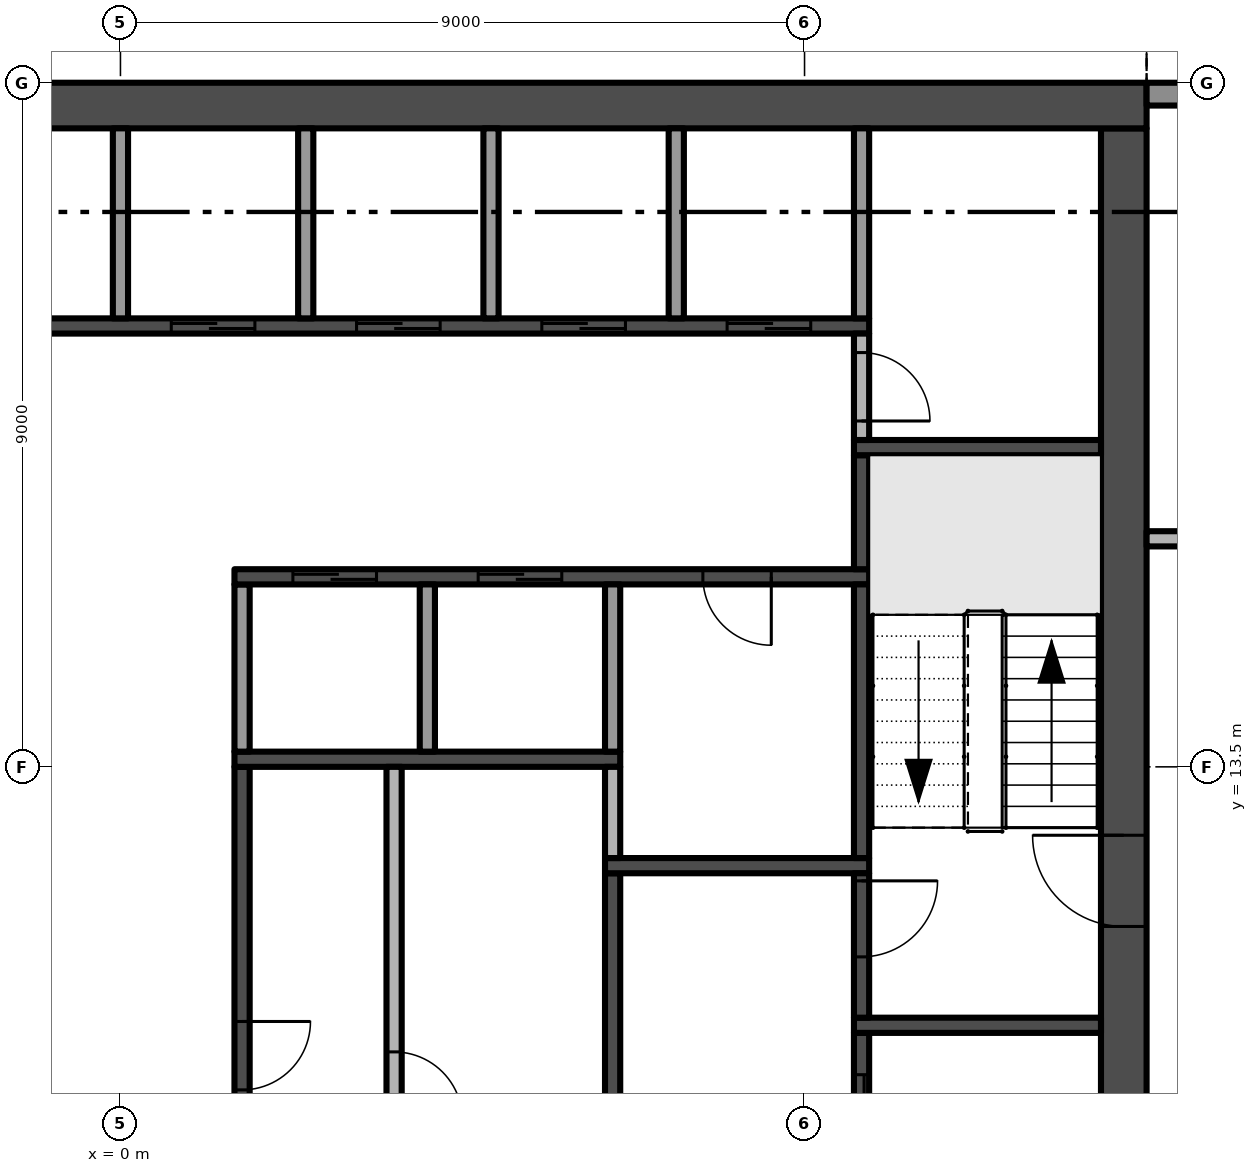
"""IFC4 building model, lengths in metres.
Left out: names, types, materials, properties, quantities, classifications, styles, units other than length and angle.
Written with IfcOpenShell. Run it as: python <this file> out.ifc"""

import sys

from ifc_helpers import new_model, si_unit, direction, frame, frame_2d, origin, place, context, subcontext, project, spatial, polyline, rectangle, outline, extrude, element, fill, save


model = new_model("IFC4")
c1 = context("Model", 3, precision=1e-05, world=origin(), true_north=direction((0.0, 1.0)))
c2 = subcontext(c1, "Body", "Model", "MODEL_VIEW")
j1 = project(units=[si_unit("LENGTHUNIT", "METRE"), si_unit("PLANEANGLEUNIT", "RADIAN")], contexts=[c1])
p1 = place(None, origin())
s1 = spatial("IfcSite", under=j1, at=p1, CompositionType="ELEMENT")
p2 = place(p1, origin())
s2 = spatial("IfcBuilding", under=s1, at=p2, CompositionType="ELEMENT")
p3 = place(p2, frame((0.0, 0.0, 203.4)))
s3 = spatial("IfcBuildingStorey", under=s2, at=p3, CompositionType="ELEMENT", Elevation=203.4)
p4 = place(p3, frame((13.2, 5.1, -0.3), z_axis=(0.0, 0.0, 1.0), x_axis=(0.0, 1.0, 0.0)))
e1 = element("IfcWall", 1, at=p4, inside=s3, PredefinedType="SHEAR", context=c2, shape_type="SweptSolid", body=[
    extrude(rectangle(XDim=16.8, YDim=0.6, at=frame_2d((8.4, 0.0))), origin(), (0.0, 0.0, 1.0), 3.8),
])
p5 = place(p4, frame((6.3, 0.0, 0.3)))
e2 = element("IfcOpeningElement", 2, at=p5, cuts=e1, PredefinedType="OPENING", context=c2, shape_type="SweptSolid", body=[
    extrude(rectangle(XDim=1.2, YDim=2.2, at=frame_2d((0.6, 1.1))), frame((0.0, 0.31, 0.0), z_axis=(0.0, -1.0, 0.0), x_axis=(1.0, 0.0, 0.0)), (0.0, 0.0, 1.0), 0.62),
])
p6 = place(p3, frame((13.5, 22.2, -0.3), z_axis=(0.0, 0.0, 1.0), x_axis=(-1.0, 0.0, 0.0)))
e3 = element("IfcWall", 3, at=p6, inside=s3, PredefinedType="SHEAR", context=c2, shape_type="SweptSolid", body=[
    extrude(rectangle(XDim=27.0, YDim=0.6, at=frame_2d((13.5, 0.0))), origin(), (0.0, 0.0, 1.0), 3.8),
])
p7 = place(p3, frame((13.5, 22.35, 0.0), z_axis=(0.0, 0.0, 1.0), x_axis=(1.0, 0.0, 0.0)))
e4 = element("IfcWall", 4, at=p7, inside=s3, PredefinedType="SOLIDWALL", context=c2, shape_type="SweptSolid", body=[
    extrude(rectangle(XDim=4.0, YDim=0.3, at=frame_2d((2.0, 0.0))), origin(), (0.0, 0.0, 1.0), 3.5),
])
p8 = place(p7, frame((0.625, 0.0, 0.0)))
e5 = element("IfcOpeningElement", 5, at=p8, cuts=e4, PredefinedType="OPENING", context=c2, shape_type="SweptSolid", body=[
    extrude(rectangle(XDim=3.075, YDim=2.4, at=frame_2d((1.538, 1.2))), frame((0.0, 0.16, 0.0), z_axis=(0.0, -1.0, 0.0), x_axis=(1.0, 0.0, 0.0)), (0.0, 0.0, 1.0), 0.32),
])
p9 = place(p3, origin())
e6 = element("IfcWall", 6, at=p9, inside=s3, PredefinedType="USERDEFINED", context=c2, shape_type="SweptSolid", body=[
    extrude(outline(polyline([(22.5, 23.1), (21.0, 23.329), (19.5, 23.929), (18.0, 24.671), (16.5, 25.271), (15.0, 25.5), (13.5, 25.271), (13.538, 25.024), (15.0, 25.247), (16.434, 25.028), (17.898, 24.442), (19.398, 23.701), (20.934, 23.086), (22.462, 22.853), (22.5, 23.1)])), origin(), (0.0, 0.0, 1.0), 0.9),
])
p10 = place(p3, frame((-9.85, 19.3, 0.0), z_axis=(0.0, 0.0, 1.0), x_axis=(1.0, 0.0, 0.0)))
e7 = element("IfcWall", 7, at=p10, inside=s3, PredefinedType="SHEAR", context=c2, shape_type="SweptSolid", body=[
    extrude(rectangle(XDim=19.7, YDim=0.2, at=frame_2d((9.85, 0.0))), origin(), (0.0, 0.0, 1.0), 3.5),
])
p11 = place(p10, frame((10.519, 0.0, 0.0)))
e8 = element("IfcOpeningElement", 8, at=p11, cuts=e7, PredefinedType="OPENING", context=c2, shape_type="SweptSolid", body=[
    extrude(rectangle(XDim=1.1, YDim=2.1, at=frame_2d((0.55, 1.05))), frame((0.0, 0.11, 0.0), z_axis=(0.0, -1.0, 0.0), x_axis=(1.0, 0.0, 0.0)), (0.0, 0.0, 1.0), 0.22),
])
p12 = place(p10, frame((12.956, 0.0, 0.0)))
e9 = element("IfcOpeningElement", 9, at=p12, cuts=e7, PredefinedType="OPENING", context=c2, shape_type="SweptSolid", body=[
    extrude(rectangle(XDim=1.1, YDim=2.1, at=frame_2d((0.55, 1.05))), frame((0.0, 0.11, 0.0), z_axis=(0.0, -1.0, 0.0), x_axis=(1.0, 0.0, 0.0)), (0.0, 0.0, 1.0), 0.22),
])
p13 = place(p10, frame((15.394, 0.0, 0.0)))
e10 = element("IfcOpeningElement", 10, at=p13, cuts=e7, PredefinedType="OPENING", context=c2, shape_type="SweptSolid", body=[
    extrude(rectangle(XDim=1.1, YDim=2.1, at=frame_2d((0.55, 1.05))), frame((0.0, 0.11, 0.0), z_axis=(0.0, -1.0, 0.0), x_axis=(1.0, 0.0, 0.0)), (0.0, 0.0, 1.0), 0.22),
])
p14 = place(p10, frame((17.831, 0.0, 0.0)))
e11 = element("IfcOpeningElement", 11, at=p14, cuts=e7, PredefinedType="OPENING", context=c2, shape_type="SweptSolid", body=[
    extrude(rectangle(XDim=1.1, YDim=2.1, at=frame_2d((0.55, 1.05))), frame((0.0, 0.11, 0.0), z_axis=(0.0, -1.0, 0.0), x_axis=(1.0, 0.0, 0.0)), (0.0, 0.0, 1.0), 0.22),
])
p15 = place(p10, frame((2.087, 0.0, 0.0)))
e12 = element("IfcOpeningElement", 12, at=p15, cuts=e7, PredefinedType="OPENING", context=c2, shape_type="SweptSolid", body=[
    extrude(rectangle(XDim=0.9, YDim=2.1, at=frame_2d((0.45, 1.05))), frame((0.0, 0.11, 0.0), z_axis=(0.0, -1.0, 0.0), x_axis=(1.0, 0.0, 0.0)), (0.0, 0.0, 1.0), 0.22),
])
p16 = place(p10, frame((6.963, 0.0, 0.0)))
e13 = element("IfcOpeningElement", 13, at=p16, cuts=e7, PredefinedType="OPENING", context=c2, shape_type="SweptSolid", body=[
    extrude(rectangle(XDim=0.9, YDim=2.1, at=frame_2d((0.45, 1.05))), frame((0.0, 0.11, 0.0), z_axis=(0.0, -1.0, 0.0), x_axis=(1.0, 0.0, 0.0)), (0.0, 0.0, 1.0), 0.22),
])
p17 = place(p3, frame((0.0, 19.4, 0.0), z_axis=(0.0, 0.0, 1.0), x_axis=(0.0, 1.0, 0.0)))
e14 = element("IfcWall", 14, at=p17, inside=s3, PredefinedType="PARTITIONING", context=c2, shape_type="SweptSolid", body=[
    extrude(rectangle(XDim=2.5, YDim=0.2, at=frame_2d((1.25, 0.0))), origin(), (0.0, 0.0, 1.0), 3.5),
])
p18 = place(p3, frame((1.6, 13.5, 0.0), z_axis=(0.0, 0.0, 1.0), x_axis=(0.0, -1.0, 0.0)))
e15 = element("IfcWall", 15, at=p18, inside=s3, PredefinedType="SHEAR", context=c2, shape_type="SweptSolid", body=[
    extrude(rectangle(XDim=8.4, YDim=0.2, at=frame_2d((4.2, 0.0))), origin(), (0.0, 0.0, 1.0), 3.5),
])
p19 = place(p18, frame((3.35, 0.0, 0.0)))
e16 = element("IfcOpeningElement", 16, at=p19, cuts=e15, PredefinedType="OPENING", context=c2, shape_type="SweptSolid", body=[
    extrude(rectangle(XDim=0.9, YDim=2.1, at=frame_2d((0.45, 1.05))), frame((0.0, 0.11, 0.0), z_axis=(0.0, -1.0, 0.0), x_axis=(1.0, 0.0, 0.0)), (0.0, 0.0, 1.0), 0.22),
])
p20 = place(p3, frame((1.5, 13.6, 0.0), z_axis=(0.0, 0.0, 1.0), x_axis=(1.0, 0.0, 0.0)))
e17 = element("IfcWall", 17, at=p20, inside=s3, PredefinedType="SHEAR", context=c2, shape_type="SweptSolid", body=[
    extrude(rectangle(XDim=5.075, YDim=0.2, at=frame_2d((2.538, 0.0))), origin(), (0.0, 0.0, 1.0), 3.5),
])
p21 = place(p3, frame((1.6, 13.7, 0.0), z_axis=(0.0, 0.0, 1.0), x_axis=(0.0, 1.0, 0.0)))
e18 = element("IfcWall", 18, at=p21, inside=s3, PredefinedType="PARTITIONING", context=c2, shape_type="SweptSolid", body=[
    extrude(rectangle(XDim=2.2, YDim=0.2, at=frame_2d((1.1, 0.0))), origin(), (0.0, 0.0, 1.0), 3.5),
])
p22 = place(p3, frame((9.85, 16.0, 0.0), z_axis=(0.0, 0.0, 1.0), x_axis=(-1.0, 0.0, 0.0)))
e19 = element("IfcWall", 19, at=p22, inside=s3, PredefinedType="SHEAR", context=c2, shape_type="SweptSolid", body=[
    extrude(rectangle(XDim=8.35, YDim=0.2, at=frame_2d((4.175, 0.0))), origin(), (0.0, 0.0, 1.0), 3.5),
])
p23 = place(p22, frame((6.481, 0.0, 0.0)))
e20 = element("IfcOpeningElement", 20, at=p23, cuts=e19, PredefinedType="OPENING", context=c2, shape_type="SweptSolid", body=[
    extrude(rectangle(XDim=1.1, YDim=2.1, at=frame_2d((0.55, 1.05))), frame((0.0, 0.11, 0.0), z_axis=(0.0, -1.0, 0.0), x_axis=(1.0, 0.0, 0.0)), (0.0, 0.0, 1.0), 0.22),
])
p24 = place(p22, frame((4.044, 0.0, 0.0)))
e21 = element("IfcOpeningElement", 21, at=p24, cuts=e19, PredefinedType="OPENING", context=c2, shape_type="SweptSolid", body=[
    extrude(rectangle(XDim=1.1, YDim=2.1, at=frame_2d((0.55, 1.05))), frame((0.0, 0.11, 0.0), z_axis=(0.0, -1.0, 0.0), x_axis=(1.0, 0.0, 0.0)), (0.0, 0.0, 1.0), 0.22),
])
p25 = place(p22, frame((1.288, 0.0, 0.0)))
e22 = element("IfcOpeningElement", 22, at=p25, cuts=e19, PredefinedType="OPENING", context=c2, shape_type="SweptSolid", body=[
    extrude(rectangle(XDim=0.9, YDim=2.1, at=frame_2d((0.45, 1.05))), frame((0.0, 0.11, 0.0), z_axis=(0.0, -1.0, 0.0), x_axis=(1.0, 0.0, 0.0)), (0.0, 0.0, 1.0), 0.22),
])
p26 = place(p3, frame((2.438, 19.4, 0.0), z_axis=(0.0, 0.0, 1.0), x_axis=(0.0, 1.0, 0.0)))
e23 = element("IfcWall", 23, at=p26, inside=s3, PredefinedType="PARTITIONING", context=c2, shape_type="SweptSolid", body=[
    extrude(rectangle(XDim=2.5, YDim=0.2, at=frame_2d((1.25, 0.0))), origin(), (0.0, 0.0, 1.0), 3.5),
])
p27 = place(p3, frame((3.6, 13.5, 0.0), z_axis=(0.0, 0.0, 1.0), x_axis=(0.0, -1.0, 0.0)))
e24 = element("IfcWall", 24, at=p27, inside=s3, PredefinedType="PARTITIONING", context=c2, shape_type="SweptSolid", body=[
    extrude(rectangle(XDim=8.4, YDim=0.2, at=frame_2d((4.2, 0.0))), origin(), (0.0, 0.0, 1.0), 3.5),
])
p28 = place(p27, frame((3.75, 0.0, 0.0)))
e25 = element("IfcOpeningElement", 25, at=p28, cuts=e24, PredefinedType="OPENING", context=c2, shape_type="SweptSolid", body=[
    extrude(rectangle(XDim=0.9, YDim=2.1, at=frame_2d((0.45, 1.05))), frame((0.0, 0.11, 0.0), z_axis=(0.0, -1.0, 0.0), x_axis=(1.0, 0.0, 0.0)), (0.0, 0.0, 1.0), 0.22),
])
p29 = place(p3, frame((4.037, 13.7, 0.0), z_axis=(0.0, 0.0, 1.0), x_axis=(0.0, 1.0, 0.0)))
e26 = element("IfcWall", 26, at=p29, inside=s3, PredefinedType="PARTITIONING", context=c2, shape_type="SweptSolid", body=[
    extrude(rectangle(XDim=2.2, YDim=0.2, at=frame_2d((1.1, 0.0))), origin(), (0.0, 0.0, 1.0), 3.5),
])
p30 = place(p3, frame((4.875, 19.4, 0.0), z_axis=(0.0, 0.0, 1.0), x_axis=(0.0, 1.0, 0.0)))
e27 = element("IfcWall", 27, at=p30, inside=s3, PredefinedType="PARTITIONING", context=c2, shape_type="SweptSolid", body=[
    extrude(rectangle(XDim=2.5, YDim=0.2, at=frame_2d((1.25, 0.0))), origin(), (0.0, 0.0, 1.0), 3.5),
])
p31 = place(p3, frame((6.475, 5.1, 0.0), z_axis=(0.0, 0.0, 1.0), x_axis=(0.0, 1.0, 0.0)))
e28 = element("IfcWall", 28, at=p31, inside=s3, PredefinedType="SHEAR", context=c2, shape_type="SweptSolid", body=[
    extrude(rectangle(XDim=7.0, YDim=0.2, at=frame_2d((3.5, 0.0))), origin(), (0.0, 0.0, 1.0), 3.5),
])
p32 = place(p3, frame((6.375, 12.2, 0.0), z_axis=(0.0, 0.0, 1.0), x_axis=(1.0, 0.0, 0.0)))
e29 = element("IfcWall", 29, at=p32, inside=s3, PredefinedType="SHEAR", context=c2, shape_type="SweptSolid", body=[
    extrude(rectangle(XDim=3.475, YDim=0.2, at=frame_2d((1.738, 0.0))), origin(), (0.0, 0.0, 1.0), 3.5),
])
p33 = place(p3, frame((6.475, 12.3, 0.0), z_axis=(0.0, 0.0, 1.0), x_axis=(0.0, 1.0, 0.0)))
e30 = element("IfcWall", 30, at=p33, inside=s3, PredefinedType="PARTITIONING", context=c2, shape_type="SweptSolid", body=[
    extrude(rectangle(XDim=1.2, YDim=0.2, at=frame_2d((0.6, 0.0))), origin(), (0.0, 0.0, 1.0), 3.5),
])
p34 = place(p3, frame((6.475, 13.7, 0.0), z_axis=(0.0, 0.0, 1.0), x_axis=(0.0, 1.0, 0.0)))
e31 = element("IfcWall", 31, at=p34, inside=s3, PredefinedType="PARTITIONING", context=c2, shape_type="SweptSolid", body=[
    extrude(rectangle(XDim=2.2, YDim=0.2, at=frame_2d((1.1, 0.0))), origin(), (0.0, 0.0, 1.0), 3.5),
])
p35 = place(p3, frame((7.312, 19.4, 0.0), z_axis=(0.0, 0.0, 1.0), x_axis=(0.0, 1.0, 0.0)))
e32 = element("IfcWall", 32, at=p35, inside=s3, PredefinedType="PARTITIONING", context=c2, shape_type="SweptSolid", body=[
    extrude(rectangle(XDim=2.5, YDim=0.2, at=frame_2d((1.25, 0.0))), origin(), (0.0, 0.0, 1.0), 3.5),
])
p36 = place(p3, frame((9.75, 7.8, 0.0), z_axis=(0.0, 0.0, 1.0), x_axis=(0.0, 1.0, 0.0)))
e33 = element("IfcWall", 33, at=p36, inside=s3, PredefinedType="SHEAR", context=c2, shape_type="SweptSolid", body=[
    extrude(rectangle(XDim=2.2, YDim=0.2, at=frame_2d((1.1, 0.0))), origin(), (0.0, 0.0, 1.0), 3.5),
])
p37 = place(p36, frame((0.55, 0.0, 0.0)))
e34 = element("IfcOpeningElement", 34, at=p37, cuts=e33, PredefinedType="OPENING", context=c2, shape_type="SweptSolid", body=[
    extrude(rectangle(XDim=1.1, YDim=2.1, at=frame_2d((0.55, 1.05))), frame((0.0, 0.11, 0.0), z_axis=(0.0, -1.0, 0.0), x_axis=(1.0, 0.0, 0.0)), (0.0, 0.0, 1.0), 0.22),
])
p38 = place(p3, frame((9.65, 10.1, 0.0), z_axis=(0.0, 0.0, 1.0), x_axis=(1.0, 0.0, 0.0)))
e35 = element("IfcWall", 35, at=p38, inside=s3, PredefinedType="SHEAR", context=c2, shape_type="SweptSolid", body=[
    extrude(rectangle(XDim=3.25, YDim=0.2, at=frame_2d((1.625, 0.0))), origin(), (0.0, 0.0, 1.0), 3.5),
])
p39 = place(p3, frame((9.75, 12.1, 0.0), z_axis=(0.0, 0.0, 1.0), x_axis=(0.0, -1.0, 0.0)))
e36 = element("IfcWall", 36, at=p39, inside=s3, PredefinedType="SHEAR", context=c2, shape_type="SweptSolid", body=[
    extrude(rectangle(XDim=1.9, YDim=0.2, at=frame_2d((0.95, 0.0))), origin(), (0.0, 0.0, 1.0), 3.5),
])
p40 = place(p39, frame((0.1, 0.0, 0.0)))
e37 = element("IfcOpeningElement", 37, at=p40, cuts=e36, PredefinedType="OPENING", context=c2, shape_type="SweptSolid", body=[
    extrude(rectangle(XDim=1.0, YDim=2.2, at=frame_2d((0.5, 1.1))), frame((0.0, 0.11, 0.0), z_axis=(0.0, -1.0, 0.0), x_axis=(1.0, 0.0, 0.0)), (0.0, 0.0, 1.0), 0.22),
])
p41 = place(p3, frame((9.75, 12.3, 0.0), z_axis=(0.0, 0.0, 1.0), x_axis=(0.0, 1.0, 0.0)))
e38 = element("IfcWall", 38, at=p41, inside=s3, PredefinedType="SHEAR", context=c2, shape_type="SweptSolid", body=[
    extrude(rectangle(XDim=3.6, YDim=0.2, at=frame_2d((1.8, 0.0))), origin(), (0.0, 0.0, 1.0), 3.5),
])
p42 = place(p3, frame((9.75, 16.1, 0.0), z_axis=(0.0, 0.0, 1.0), x_axis=(0.0, 1.0, 0.0)))
e39 = element("IfcWall", 39, at=p42, inside=s3, PredefinedType="SHEAR", context=c2, shape_type="SweptSolid", body=[
    extrude(rectangle(XDim=1.5, YDim=0.2, at=frame_2d((0.75, 0.0))), origin(), (0.0, 0.0, 1.0), 3.5),
])
p43 = place(p3, frame((9.65, 17.7, 0.0), z_axis=(0.0, 0.0, 1.0), x_axis=(1.0, 0.0, 0.0)))
e40 = element("IfcWall", 40, at=p43, inside=s3, PredefinedType="SHEAR", context=c2, shape_type="SweptSolid", body=[
    extrude(rectangle(XDim=3.25, YDim=0.2, at=frame_2d((1.625, 0.0))), origin(), (0.0, 0.0, 1.0), 3.5),
])
p44 = place(p3, frame((9.75, 19.2, 0.0), z_axis=(0.0, 0.0, 1.0), x_axis=(0.0, -1.0, 0.0)))
e41 = element("IfcWall", 41, at=p44, inside=s3, PredefinedType="PARTITIONING", context=c2, shape_type="SweptSolid", body=[
    extrude(rectangle(XDim=1.4, YDim=0.2, at=frame_2d((0.7, 0.0))), origin(), (0.0, 0.0, 1.0), 3.5),
])
p45 = place(p44, frame((0.25, 0.0, 0.0)))
e42 = element("IfcOpeningElement", 42, at=p45, cuts=e41, PredefinedType="OPENING", context=c2, shape_type="SweptSolid", body=[
    extrude(rectangle(XDim=0.9, YDim=2.1, at=frame_2d((0.45, 1.05))), frame((0.0, 0.11, 0.0), z_axis=(0.0, -1.0, 0.0), x_axis=(1.0, 0.0, 0.0)), (0.0, 0.0, 1.0), 0.22),
])
p46 = place(p3, frame((9.75, 19.4, 0.0), z_axis=(0.0, 0.0, 1.0), x_axis=(0.0, 1.0, 0.0)))
e43 = element("IfcWall", 43, at=p46, inside=s3, PredefinedType="PARTITIONING", context=c2, shape_type="SweptSolid", body=[
    extrude(rectangle(XDim=2.5, YDim=0.2, at=frame_2d((1.25, 0.0))), origin(), (0.0, 0.0, 1.0), 3.5),
])
p47 = place(p3, frame((13.5, 16.5, 0.0), z_axis=(0.0, 0.0, 1.0), x_axis=(1.0, 0.0, 0.0)))
e44 = element("IfcWall", 44, at=p47, inside=s3, PredefinedType="PARTITIONING", context=c2, shape_type="SweptSolid", body=[
    extrude(rectangle(XDim=3.825, YDim=0.2, at=frame_2d((1.913, 0.0))), origin(), (0.0, 0.0, 1.0), 3.5),
])
p48 = place(p47, frame((1.55, 0.0, 0.0)))
e45 = element("IfcOpeningElement", 45, at=p48, cuts=e44, PredefinedType="OPENING", context=c2, shape_type="SweptSolid", body=[
    extrude(rectangle(XDim=0.9, YDim=2.1, at=frame_2d((0.45, 1.05))), frame((0.0, 0.11, 0.0), z_axis=(0.0, -1.0, 0.0), x_axis=(1.0, 0.0, 0.0)), (0.0, 0.0, 1.0), 0.22),
])
p49 = place(p5, frame((1.2, 0.0, 0.0), z_axis=(0.0, 0.0, 1.0), x_axis=(-1.0, 0.0, 0.0)))
e46 = element("IfcDoor", 46, at=p49, inside=s3, OperationType="SINGLE_SWING_LEFT", PredefinedType="DOOR", context=c2, shape_type="SweptSolid", body=[
    extrude(rectangle(XDim=1.2, YDim=2.2, at=frame_2d((0.6, 1.1))), frame((0.0, 0.025, 0.0), z_axis=(0.0, -1.0, 0.0), x_axis=(1.0, 0.0, 0.0)), (0.0, 0.0, 1.0), 0.05),
])
fill(e2, e46)
p50 = place(p40, origin())
e47 = element("IfcDoor", 47, at=p50, inside=s3, OperationType="SINGLE_SWING_LEFT", PredefinedType="DOOR", context=c2, shape_type="SweptSolid", body=[
    extrude(rectangle(XDim=1.0, YDim=2.2, at=frame_2d((0.5, 1.1))), frame((0.0, 0.025, 0.0), z_axis=(0.0, -1.0, 0.0), x_axis=(1.0, 0.0, 0.0)), (0.0, 0.0, 1.0), 0.05),
])
fill(e37, e47)
p51 = place(p11, origin())
e48 = element("IfcDoor", 48, at=p51, inside=s3, OperationType="SLIDING_TO_RIGHT", PredefinedType="DOOR", context=c2, shape_type="SweptSolid", body=[
    extrude(rectangle(XDim=1.1, YDim=2.1, at=frame_2d((0.55, 1.05))), frame((0.0, 0.025, 0.0), z_axis=(0.0, -1.0, 0.0), x_axis=(1.0, 0.0, 0.0)), (0.0, 0.0, 1.0), 0.05),
])
fill(e8, e48)
p52 = place(p12, origin())
e49 = element("IfcDoor", 49, at=p52, inside=s3, OperationType="SLIDING_TO_RIGHT", PredefinedType="DOOR", context=c2, shape_type="SweptSolid", body=[
    extrude(rectangle(XDim=1.1, YDim=2.1, at=frame_2d((0.55, 1.05))), frame((0.0, 0.025, 0.0), z_axis=(0.0, -1.0, 0.0), x_axis=(1.0, 0.0, 0.0)), (0.0, 0.0, 1.0), 0.05),
])
fill(e9, e49)
p53 = place(p13, origin())
e50 = element("IfcDoor", 50, at=p53, inside=s3, OperationType="SLIDING_TO_RIGHT", PredefinedType="DOOR", context=c2, shape_type="SweptSolid", body=[
    extrude(rectangle(XDim=1.1, YDim=2.1, at=frame_2d((0.55, 1.05))), frame((0.0, 0.025, 0.0), z_axis=(0.0, -1.0, 0.0), x_axis=(1.0, 0.0, 0.0)), (0.0, 0.0, 1.0), 0.05),
])
fill(e10, e50)
p54 = place(p14, origin())
e51 = element("IfcDoor", 51, at=p54, inside=s3, OperationType="SLIDING_TO_RIGHT", PredefinedType="DOOR", context=c2, shape_type="SweptSolid", body=[
    extrude(rectangle(XDim=1.1, YDim=2.1, at=frame_2d((0.55, 1.05))), frame((0.0, 0.025, 0.0), z_axis=(0.0, -1.0, 0.0), x_axis=(1.0, 0.0, 0.0)), (0.0, 0.0, 1.0), 0.05),
])
fill(e11, e51)
p55 = place(p23, origin())
e52 = element("IfcDoor", 52, at=p55, inside=s3, OperationType="SLIDING_TO_RIGHT", PredefinedType="DOOR", context=c2, shape_type="SweptSolid", body=[
    extrude(rectangle(XDim=1.1, YDim=2.1, at=frame_2d((0.55, 1.05))), frame((0.0, 0.025, 0.0), z_axis=(0.0, -1.0, 0.0), x_axis=(1.0, 0.0, 0.0)), (0.0, 0.0, 1.0), 0.05),
])
fill(e20, e52)
p56 = place(p24, origin())
e53 = element("IfcDoor", 53, at=p56, inside=s3, OperationType="SLIDING_TO_RIGHT", PredefinedType="DOOR", context=c2, shape_type="SweptSolid", body=[
    extrude(rectangle(XDim=1.1, YDim=2.1, at=frame_2d((0.55, 1.05))), frame((0.0, 0.025, 0.0), z_axis=(0.0, -1.0, 0.0), x_axis=(1.0, 0.0, 0.0)), (0.0, 0.0, 1.0), 0.05),
])
fill(e21, e53)
p57 = place(p37, origin())
e54 = element("IfcDoor", 54, at=p57, inside=s3, OperationType="SLIDING_TO_RIGHT", PredefinedType="DOOR", context=c2, shape_type="SweptSolid", body=[
    extrude(rectangle(XDim=1.1, YDim=2.1, at=frame_2d((0.55, 1.05))), frame((0.0, 0.025, 0.0), z_axis=(0.0, -1.0, 0.0), x_axis=(1.0, 0.0, 0.0)), (0.0, 0.0, 1.0), 0.05),
])
fill(e34, e54)
p58 = place(p19, origin())
e55 = element("IfcDoor", 55, at=p58, inside=s3, OperationType="SINGLE_SWING_LEFT", PredefinedType="DOOR", context=c2, shape_type="SweptSolid", body=[
    extrude(rectangle(XDim=0.9, YDim=2.1, at=frame_2d((0.45, 1.05))), frame((0.0, 0.025, 0.0), z_axis=(0.0, -1.0, 0.0), x_axis=(1.0, 0.0, 0.0)), (0.0, 0.0, 1.0), 0.05),
])
fill(e16, e55)
p59 = place(p25, origin())
e56 = element("IfcDoor", 56, at=p59, inside=s3, OperationType="SINGLE_SWING_LEFT", PredefinedType="DOOR", context=c2, shape_type="SweptSolid", body=[
    extrude(rectangle(XDim=0.9, YDim=2.1, at=frame_2d((0.45, 1.05))), frame((0.0, 0.025, 0.0), z_axis=(0.0, -1.0, 0.0), x_axis=(1.0, 0.0, 0.0)), (0.0, 0.0, 1.0), 0.05),
])
fill(e22, e56)
p60 = place(p45, origin())
e57 = element("IfcDoor", 57, at=p60, inside=s3, OperationType="SINGLE_SWING_RIGHT", PredefinedType="DOOR", context=c2, shape_type="SweptSolid", body=[
    extrude(rectangle(XDim=0.9, YDim=2.1, at=frame_2d((0.45, 1.05))), frame((0.0, 0.025, 0.0), z_axis=(0.0, -1.0, 0.0), x_axis=(1.0, 0.0, 0.0)), (0.0, 0.0, 1.0), 0.05),
])
fill(e42, e57)
p61 = place(p28, origin())
e58 = element("IfcDoor", 58, at=p61, inside=s3, OperationType="SINGLE_SWING_RIGHT", PredefinedType="DOOR", context=c2, shape_type="SweptSolid", body=[
    extrude(rectangle(XDim=0.9, YDim=2.1, at=frame_2d((0.45, 1.05))), frame((0.0, 0.025, 0.0), z_axis=(0.0, -1.0, 0.0), x_axis=(1.0, 0.0, 0.0)), (0.0, 0.0, 1.0), 0.05),
])
fill(e25, e58)
save(model, sys.argv[1])
